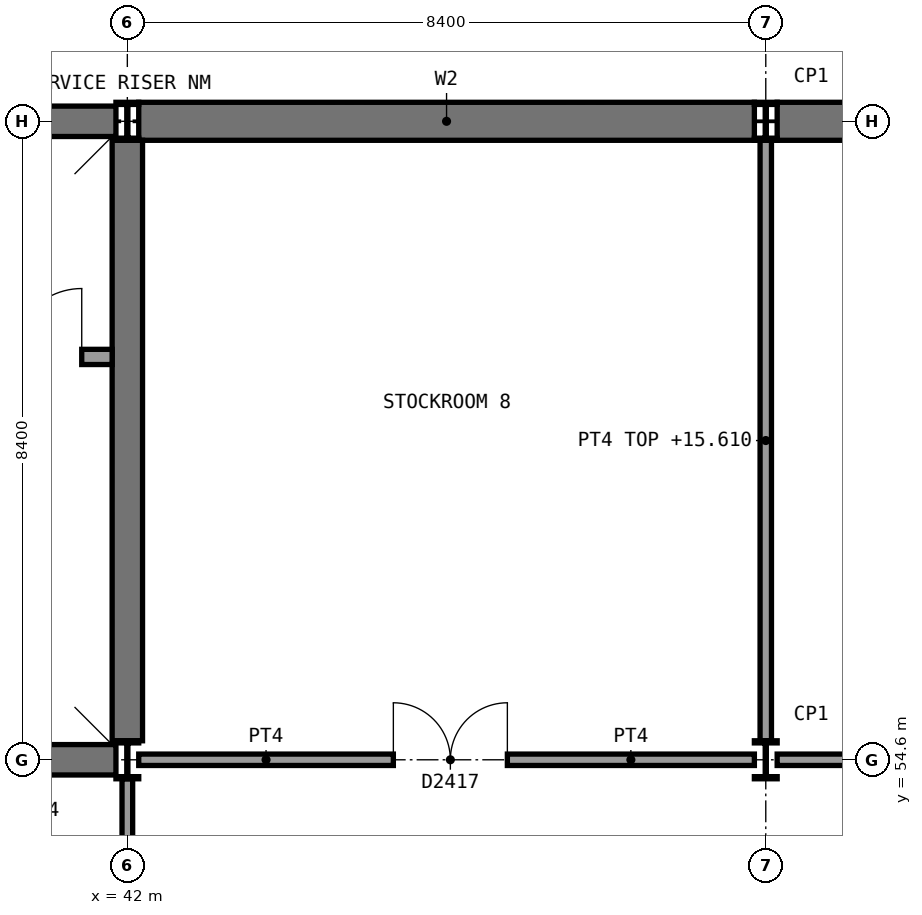
"""IFC4 building model, lengths in metres.
Left out: names, types, materials, properties, quantities, classifications, styles, units other than length and angle.
Written with IfcOpenShell. Run it as: python <this file> out.ifc"""

import sys

from ifc_helpers import new_model, si_unit, direction, frame, frame_2d, origin, origin_2d, place, context, subcontext, project, spatial, rectangle, i_section, extrude, element, fill, save


model = new_model("IFC4")
c1 = context("Model", 3, precision=1e-05, world=origin(), true_north=direction((0.0, 1.0)))
c2 = subcontext(c1, "Body", "Model", "MODEL_VIEW")
j1 = project(units=[si_unit("LENGTHUNIT", "METRE"), si_unit("PLANEANGLEUNIT", "RADIAN")], contexts=[c1])
p1 = place(None, origin())
s1 = spatial("IfcSite", under=j1, at=p1, CompositionType="ELEMENT")
p2 = place(p1, origin())
s2 = spatial("IfcBuilding", under=s1, at=p2, CompositionType="ELEMENT")
p3 = place(p2, frame((0.0, 0.0, 11.4)))
s3 = spatial("IfcBuildingStorey", under=s2, at=p3, CompositionType="ELEMENT", Elevation=11.4)
p4 = place(p3, frame((42.15, 63.0, 0.0), z_axis=(0.0, 0.0, 1.0), x_axis=(1.0, 0.0, 0.0)))
e1 = element("IfcWall", 1, at=p4, inside=s3, PredefinedType="SHEAR", context=c2, shape_type="SweptSolid", body=[
    extrude(rectangle(XDim=8.1, YDim=0.5, at=frame_2d((4.05, 0.0))), origin(), (0.0, 0.0, 1.0), 4.65),
])
p5 = place(p3, frame((50.55, 63.0, 0.0), z_axis=(0.0, 0.0, 1.0), x_axis=(1.0, 0.0, 0.0)))
e2 = element("IfcWall", 2, at=p5, inside=s3, PredefinedType="SHEAR", context=c2, shape_type="SweptSolid", body=[
    extrude(rectangle(XDim=8.1, YDim=0.5, at=frame_2d((4.05, 0.0))), origin(), (0.0, 0.0, 1.0), 4.65),
])
p6 = place(p3, frame((33.75, 63.0, 0.0), z_axis=(0.0, 0.0, 1.0), x_axis=(1.0, 0.0, 0.0)))
e3 = element("IfcWall", 3, at=p6, inside=s3, PredefinedType="SHEAR", context=c2, shape_type="SweptSolid", body=[
    extrude(rectangle(XDim=8.1, YDim=0.4, at=frame_2d((4.05, 0.0))), origin(), (0.0, 0.0, 1.0), 4.65),
])
p7 = place(p3, frame((33.75, 54.6, 0.0), z_axis=(0.0, 0.0, 1.0), x_axis=(1.0, 0.0, 0.0)))
e4 = element("IfcWall", 4, at=p7, inside=s3, PredefinedType="SHEAR", context=c2, shape_type="SweptSolid", body=[
    extrude(rectangle(XDim=8.1, YDim=0.4, at=frame_2d((4.05, 0.0))), origin(), (0.0, 0.0, 1.0), 4.65),
])
p8 = place(p7, frame((1.15, 0.0, 0.0)))
e5 = element("IfcOpeningElement", 5, at=p8, cuts=e4, PredefinedType="OPENING", context=c2, shape_type="SweptSolid", body=[
    extrude(rectangle(XDim=1.8, YDim=2.1, at=frame_2d((0.9, 1.05))), frame((0.0, 0.21, 0.0), z_axis=(0.0, -1.0, 0.0), x_axis=(1.0, 0.0, 0.0)), (0.0, 0.0, 1.0), 0.42),
])
p9 = place(p7, frame((5.3, 0.0, 0.0)))
e6 = element("IfcOpeningElement", 6, at=p9, cuts=e4, PredefinedType="OPENING", context=c2, shape_type="SweptSolid", body=[
    extrude(rectangle(XDim=1.8, YDim=2.1, at=frame_2d((0.9, 1.05))), frame((0.0, 0.21, 0.0), z_axis=(0.0, -1.0, 0.0), x_axis=(1.0, 0.0, 0.0)), (0.0, 0.0, 1.0), 0.42),
])
p10 = place(p3, frame((42.0, 54.85, 0.0), z_axis=(0.0, 0.0, 1.0), x_axis=(0.0, 1.0, 0.0)))
e7 = element("IfcWall", 7, at=p10, inside=s3, PredefinedType="SHEAR", context=c2, shape_type="SweptSolid", body=[
    extrude(rectangle(XDim=7.9, YDim=0.4, at=frame_2d((3.95, 0.0))), origin(), (0.0, 0.0, 1.0), 4.65),
])
for number, where, z_axis, x_axis in (
    (8, (42.0, 54.6, 0.0), (0.0, 0.0, 1.0), (1.0, 0.0, 0.0)),
    (9, (42.0, 63.0, 0.0), (0.0, 0.0, 1.0), (1.0, 0.0, 0.0)),
    (10, (50.4, 54.6, 0.0), (0.0, 0.0, 1.0), (1.0, 0.0, 0.0)),
    (11, (50.4, 63.0, 0.0), (0.0, 0.0, 1.0), (1.0, 0.0, 0.0)),
):
    element("IfcColumn", number, at=place(p3, frame(where, z_axis=z_axis, x_axis=x_axis)), inside=s3, PredefinedType="COLUMN", context=c2, shape_type="SweptSolid", body=[
        extrude(i_section(OverallWidth=0.3, OverallDepth=0.5, WebThickness=0.014, FlangeThickness=0.028, FilletRadius=0.027, at=origin_2d()), origin(), (0.0, 0.0, 1.0), 4.8),
    ])
p11 = place(p3, frame((50.4, 54.85, 0.0), z_axis=(0.0, 0.0, 1.0), x_axis=(0.0, 1.0, 0.0)))
e12 = element("IfcWall", 12, at=p11, inside=s3, PredefinedType="SOLIDWALL", context=c2, shape_type="SweptSolid", body=[
    extrude(rectangle(XDim=7.9, YDim=0.15, at=frame_2d((3.95, 0.0))), origin(), (0.0, 0.0, 1.0), 4.21),
])
p12 = place(p3, frame((42.15, 54.6, 0.0), z_axis=(0.0, 0.0, 1.0), x_axis=(1.0, 0.0, 0.0)))
e13 = element("IfcWall", 13, at=p12, inside=s3, PredefinedType="SOLIDWALL", context=c2, shape_type="SweptSolid", body=[
    extrude(rectangle(XDim=8.1, YDim=0.15, at=frame_2d((4.05, 0.0))), origin(), (0.0, 0.0, 1.0), 4.32),
])
p13 = place(p12, frame((3.35, 0.0, 0.0)))
e14 = element("IfcOpeningElement", 14, at=p13, cuts=e13, PredefinedType="OPENING", context=c2, shape_type="SweptSolid", body=[
    extrude(rectangle(XDim=1.5, YDim=2.1, at=frame_2d((0.75, 1.05))), frame((0.0, 0.085, 0.0), z_axis=(0.0, -1.0, 0.0), x_axis=(1.0, 0.0, 0.0)), (0.0, 0.0, 1.0), 0.17),
])
p14 = place(p3, frame((50.55, 54.6, 0.0), z_axis=(0.0, 0.0, 1.0), x_axis=(1.0, 0.0, 0.0)))
e15 = element("IfcWall", 15, at=p14, inside=s3, PredefinedType="SOLIDWALL", context=c2, shape_type="SweptSolid", body=[
    extrude(rectangle(XDim=8.1, YDim=0.15, at=frame_2d((4.05, 0.0))), origin(), (0.0, 0.0, 1.0), 4.32),
])
p15 = place(p14, frame((3.35, 0.0, 0.0)))
e16 = element("IfcOpeningElement", 16, at=p15, cuts=e15, PredefinedType="OPENING", context=c2, shape_type="SweptSolid", body=[
    extrude(rectangle(XDim=1.5, YDim=2.1, at=frame_2d((0.75, 1.05))), frame((0.0, 0.085, 0.0), z_axis=(0.0, -1.0, 0.0), x_axis=(1.0, 0.0, 0.0)), (0.0, 0.0, 1.0), 0.17),
])
p16 = place(p3, frame((42.0, 51.35, 0.0), z_axis=(0.0, 0.0, 1.0), x_axis=(0.0, 1.0, 0.0)))
e17 = element("IfcWall", 17, at=p16, inside=s3, PredefinedType="PARTITIONING", context=c2, shape_type="SweptSolid", body=[
    extrude(rectangle(XDim=3.0, YDim=0.14, at=frame_2d((1.5, 0.0))), origin(), (0.0, 0.0, 1.0), 4.21),
])
p17 = place(p3, frame((40.05, 59.9, 0.0), z_axis=(0.0, 0.0, 1.0), x_axis=(1.0, 0.0, 0.0)))
e18 = element("IfcWall", 18, at=p17, inside=s3, PredefinedType="PARTITIONING", context=c2, shape_type="SweptSolid", body=[
    extrude(rectangle(XDim=1.75, YDim=0.2, at=frame_2d((0.875, 0.0))), origin(), (0.0, 0.0, 1.0), 4.65),
])
p18 = place(p17, frame((0.45, 0.0, 0.0)))
e19 = element("IfcOpeningElement", 19, at=p18, cuts=e18, PredefinedType="OPENING", context=c2, shape_type="SweptSolid", body=[
    extrude(rectangle(XDim=0.9, YDim=2.1, at=frame_2d((0.45, 1.05))), frame((0.0, 0.11, 0.0), z_axis=(0.0, -1.0, 0.0), x_axis=(1.0, 0.0, 0.0)), (0.0, 0.0, 1.0), 0.22),
])
p19 = place(p13, origin())
e20 = element("IfcDoor", 20, at=p19, inside=s3, OperationType="DOUBLE_DOOR_SINGLE_SWING", PredefinedType="DOOR", context=c2, shape_type="SweptSolid", body=[
    extrude(rectangle(XDim=1.5, YDim=2.1, at=frame_2d((0.75, 1.05))), frame((0.0, 0.025, 0.0), z_axis=(0.0, -1.0, 0.0), x_axis=(1.0, 0.0, 0.0)), (0.0, 0.0, 1.0), 0.05),
])
fill(e14, e20)
p20 = place(p18, origin())
e21 = element("IfcDoor", 21, at=p20, inside=s3, OperationType="SINGLE_SWING_RIGHT", PredefinedType="DOOR", context=c2, shape_type="SweptSolid", body=[
    extrude(rectangle(XDim=0.9, YDim=2.1, at=frame_2d((0.45, 1.05))), frame((0.0, 0.025, 0.0), z_axis=(0.0, -1.0, 0.0), x_axis=(1.0, 0.0, 0.0)), (0.0, 0.0, 1.0), 0.05),
])
fill(e19, e21)
save(model, sys.argv[1])
